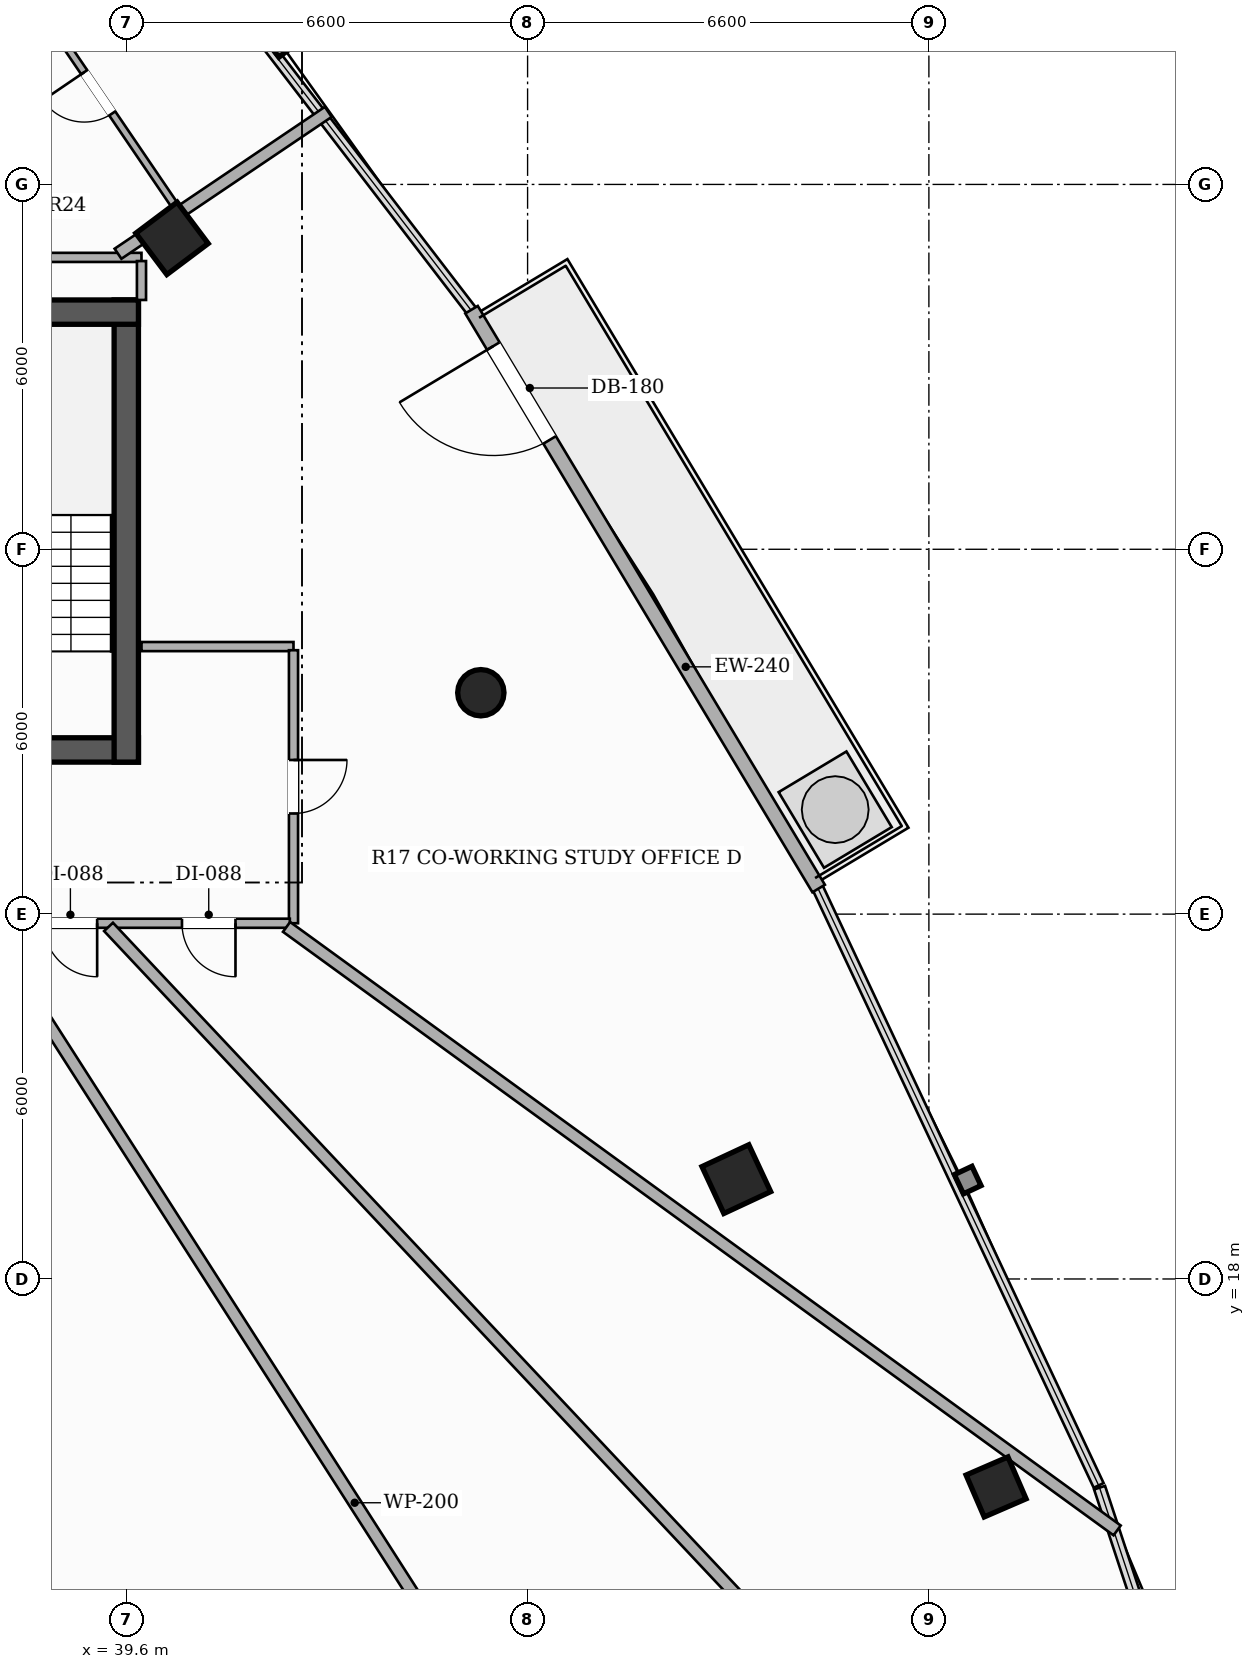
"""IFC4 building model, lengths in metres.
Left out: names, types, materials, properties, quantities, classifications, styles, units other than length and angle.
Written with IfcOpenShell. Run it as: python <this file> out.ifc"""

import sys

from ifc_helpers import new_model, si_unit, direction, frame, frame_2d, origin, origin_2d, place, context, subcontext, project, spatial, rectangle, hollow_rectangle, hollow_circle, extrude, element, fill, save


model = new_model("IFC4")
c1 = context("Model", 3, precision=1e-05, world=origin(), true_north=direction((0.0, 1.0)))
c2 = subcontext(c1, "Body", "Model", "MODEL_VIEW")
j1 = project(units=[si_unit("LENGTHUNIT", "METRE"), si_unit("PLANEANGLEUNIT", "RADIAN")], contexts=[c1])
p1 = place(None, origin())
s1 = spatial("IfcSite", under=j1, at=p1, CompositionType="ELEMENT")
p2 = place(p1, origin())
s2 = spatial("IfcBuilding", under=s1, at=p2, CompositionType="ELEMENT")
p3 = place(p2, frame((0.0, 0.0, 163.85)))
s3 = spatial("IfcBuildingStorey", under=s2, at=p3, CompositionType="ELEMENT", Elevation=163.85)
p4 = place(p3, frame((26.2, 26.7, 0.0), z_axis=(0.0, 0.0, 1.0), x_axis=(1.0, 0.0, 0.0)))
e1 = element("IfcWall", 1, at=p4, inside=s3, PredefinedType="SHEAR", context=c2, shape_type="SweptSolid", body=[
    extrude(rectangle(XDim=13.6, YDim=0.4, at=frame_2d((6.8, 0.0))), origin(), (0.0, 0.0, 1.0), 3.3),
])
p5 = place(p4, frame((4.35, 0.0, 0.0)))
e2 = element("IfcOpeningElement", 2, at=p5, cuts=e1, PredefinedType="OPENING", context=c2, shape_type="SweptSolid", body=[
    extrude(rectangle(XDim=1.05, YDim=2.15, at=frame_2d((0.525, 1.075))), frame((0.0, 0.21, 0.0), z_axis=(0.0, -1.0, 0.0), x_axis=(1.0, 0.0, 0.0)), (0.0, 0.0, 1.0), 0.42),
])
p6 = place(p4, frame((8.3, 0.0, 0.0)))
e3 = element("IfcOpeningElement", 3, at=p6, cuts=e1, PredefinedType="OPENING", context=c2, shape_type="SweptSolid", body=[
    extrude(rectangle(XDim=1.05, YDim=2.15, at=frame_2d((0.525, 1.075))), frame((0.0, 0.21, 0.0), z_axis=(0.0, -1.0, 0.0), x_axis=(1.0, 0.0, 0.0)), (0.0, 0.0, 1.0), 0.42),
])
p7 = place(p3, frame((39.6, 26.5, 0.0), z_axis=(0.0, 0.0, 1.0), x_axis=(0.0, 1.0, 0.0)))
e4 = element("IfcWall", 4, at=p7, inside=s3, PredefinedType="SHEAR", context=c2, shape_type="SweptSolid", body=[
    extrude(rectangle(XDim=7.6, YDim=0.4, at=frame_2d((3.8, 0.0))), origin(), (0.0, 0.0, 1.0), 3.3),
])
p8 = place(p3, frame((36.12, 33.9, 0.0), z_axis=(0.0, 0.0, 1.0), x_axis=(1.0, 0.0, 0.0)))
e5 = element("IfcWall", 5, at=p8, inside=s3, PredefinedType="SHEAR", context=c2, shape_type="SweptSolid", body=[
    extrude(rectangle(XDim=3.68, YDim=0.4, at=frame_2d((1.84, 0.0))), origin(), (0.0, 0.0, 1.0), 3.3),
])
p9 = place(p3, frame((49.633, 19.642, 0.0), z_axis=(0.0, 0.0, 1.0), x_axis=(-0.422618261741, 0.906307787037, 0.0)))
e6 = element("IfcColumn", 6, at=p9, inside=s3, PredefinedType="COLUMN", context=c2, shape_type="SweptSolid", body=[
    extrude(hollow_rectangle(XDim=0.85, YDim=0.85, WallThickness=0.028, at=origin_2d()), origin(), (0.0, 0.0, 1.0), 3.3),
])
p10 = place(p3, frame((45.431, 27.641, 0.0), z_axis=(0.0, 0.0, 1.0), x_axis=(1.0, 0.0, 0.0)))
e7 = element("IfcColumn", 7, at=p10, inside=s3, PredefinedType="COLUMN", context=c2, shape_type="SweptSolid", body=[
    extrude(hollow_circle(Radius=0.381, WallThickness=0.022, at=origin_2d()), origin(), (0.0, 0.0, 1.0), 3.3),
])
p11 = place(p3, frame((40.352, 35.113, 0.0), z_axis=(0.0, 0.0, 1.0), x_axis=(-0.600420225326, 0.799684658487, 0.0)))
e8 = element("IfcColumn", 8, at=p11, inside=s3, PredefinedType="COLUMN", context=c2, shape_type="SweptSolid", body=[
    extrude(hollow_rectangle(XDim=0.85, YDim=0.85, WallThickness=0.028, at=origin_2d()), origin(), (0.0, 0.0, 1.0), 3.3),
])
p12 = place(p3, frame((53.905, 14.58, 0.0), z_axis=(0.0, 0.0, 1.0), x_axis=(-0.397147890635, 0.917754625684, 0.0)))
e9 = element("IfcColumn", 9, at=p12, inside=s3, PredefinedType="COLUMN", context=c2, shape_type="SweptSolid", body=[
    extrude(hollow_rectangle(XDim=0.75, YDim=0.75, WallThickness=0.025, at=origin_2d()), origin(), (0.0, 0.0, 1.0), 3.3),
])
p13 = place(p3, frame((50.987, 24.421, 0.0), z_axis=(0.0, 0.0, 1.0), x_axis=(-0.514334017412, 0.85758994778, 0.0)))
e10 = element("IfcWall", 10, at=p13, inside=s3, PredefinedType="SOLIDWALL", context=c2, shape_type="SweptSolid", body=[
    extrude(rectangle(XDim=11.1, YDim=0.24, at=frame_2d((5.55, 0.0))), origin(), (0.0, 0.0, 1.0), 2.624),
])
p14 = place(p13, frame((8.602, 0.0, 0.0)))
e11 = element("IfcOpeningElement", 11, at=p14, cuts=e10, PredefinedType="OPENING", context=c2, shape_type="SweptSolid", body=[
    extrude(rectangle(XDim=1.8, YDim=2.2, at=frame_2d((0.9, 1.1))), frame((0.0, 0.13, 0.0), z_axis=(0.0, -1.0, 0.0), x_axis=(1.0, 0.0, 0.0)), (0.0, 0.0, 1.0), 0.26),
])
p15 = place(p3, frame((39.85, 28.4, 0.0), z_axis=(0.0, 0.0, 1.0), x_axis=(1.0, 0.0, 0.0)))
e12 = element("IfcWall", 12, at=p15, inside=s3, PredefinedType="PARTITIONING", context=c2, shape_type="SweptSolid", body=[
    extrude(rectangle(XDim=2.5, YDim=0.15, at=frame_2d((1.25, 0.0))), origin(), (0.0, 0.0, 1.0), 2.721),
])
p16 = place(p3, frame((42.35, 28.34, 0.0), z_axis=(0.0, 0.0, 1.0), x_axis=(0.0, -1.0, 0.0)))
e13 = element("IfcWall", 13, at=p16, inside=s3, PredefinedType="PARTITIONING", context=c2, shape_type="SweptSolid", body=[
    extrude(rectangle(XDim=4.49, YDim=0.15, at=frame_2d((2.245, 0.0))), origin(), (0.0, 0.0, 1.0), 2.721),
])
p17 = place(p16, frame((1.805, 0.0, 0.0)))
e14 = element("IfcOpeningElement", 14, at=p17, cuts=e13, PredefinedType="OPENING", context=c2, shape_type="SweptSolid", body=[
    extrude(rectangle(XDim=0.88, YDim=2.1, at=frame_2d((0.44, 1.05))), frame((0.0, 0.085, 0.0), z_axis=(0.0, -1.0, 0.0), x_axis=(1.0, 0.0, 0.0)), (0.0, 0.0, 1.0), 0.17),
])
p18 = place(p3, frame((42.29, 23.85, 0.0), z_axis=(0.0, 0.0, 1.0), x_axis=(-1.0, 0.0, 0.0)))
e15 = element("IfcWall", 15, at=p18, inside=s3, PredefinedType="PARTITIONING", context=c2, shape_type="SweptSolid", body=[
    extrude(rectangle(XDim=8.202, YDim=0.15, at=frame_2d((4.101, 0.0))), origin(), (0.0, 0.0, 1.0), 2.492),
])
p19 = place(p18, frame((5.987, 0.0, 0.0)))
e16 = element("IfcOpeningElement", 16, at=p19, cuts=e15, PredefinedType="OPENING", context=c2, shape_type="SweptSolid", body=[
    extrude(rectangle(XDim=0.92, YDim=2.15, at=frame_2d((0.46, 1.075))), frame((0.0, 0.085, 0.0), z_axis=(0.0, -1.0, 0.0), x_axis=(1.0, 0.0, 0.0)), (0.0, 0.0, 1.0), 0.17),
])
p20 = place(p18, frame((0.894, 0.0, 0.0)))
e17 = element("IfcOpeningElement", 17, at=p20, cuts=e15, PredefinedType="OPENING", context=c2, shape_type="SweptSolid", body=[
    extrude(rectangle(XDim=0.88, YDim=2.1, at=frame_2d((0.44, 1.05))), frame((0.0, 0.085, 0.0), z_axis=(0.0, -1.0, 0.0), x_axis=(1.0, 0.0, 0.0)), (0.0, 0.0, 1.0), 0.17),
])
p21 = place(p18, frame((3.169, 0.0, 0.0)))
e18 = element("IfcOpeningElement", 18, at=p21, cuts=e15, PredefinedType="OPENING", context=c2, shape_type="SweptSolid", body=[
    extrude(rectangle(XDim=0.88, YDim=2.1, at=frame_2d((0.44, 1.05))), frame((0.0, 0.085, 0.0), z_axis=(0.0, -1.0, 0.0), x_axis=(1.0, 0.0, 0.0)), (0.0, 0.0, 1.0), 0.17),
])
p22 = place(p3, frame((37.91, 34.8, 0.0), z_axis=(0.0, 0.0, 1.0), x_axis=(1.0, 0.0, 0.0)))
e19 = element("IfcWall", 19, at=p22, inside=s3, PredefinedType="PARTITIONING", context=c2, shape_type="SweptSolid", body=[
    extrude(rectangle(XDim=1.94, YDim=0.15, at=frame_2d((0.97, 0.0))), origin(), (0.0, 0.0, 1.0), 2.721),
])
p23 = place(p3, frame((39.85, 34.74, 0.0), z_axis=(0.0, 0.0, 1.0), x_axis=(0.0, -1.0, 0.0)))
e20 = element("IfcWall", 20, at=p23, inside=s3, PredefinedType="PARTITIONING", context=c2, shape_type="SweptSolid", body=[
    extrude(rectangle(XDim=0.64, YDim=0.15, at=frame_2d((0.32, 0.0))), origin(), (0.0, 0.0, 1.0), 2.721),
])
p24 = place(p3, frame((37.295, 23.79, 0.0), z_axis=(0.0, 0.0, 1.0), x_axis=(0.539100523601, -0.842241429433, 0.0)))
e21 = element("IfcWall", 21, at=p24, inside=s3, PredefinedType="PARTITIONING", context=c2, shape_type="SweptSolid", body=[
    extrude(rectangle(XDim=22.488, YDim=0.2, at=frame_2d((11.244, 0.0))), origin(), (0.0, 0.0, 1.0), 2.413),
])
p25 = place(p3, frame((39.464, 34.86, 0.0), z_axis=(0.0, 0.0, 1.0), x_axis=(0.828976210701, 0.559283865395, 0.0)))
e22 = element("IfcWall", 22, at=p25, inside=s3, PredefinedType="PARTITIONING", context=c2, shape_type="SweptSolid", body=[
    extrude(rectangle(XDim=4.171, YDim=0.2, at=frame_2d((2.086, 0.0))), origin(), (0.0, 0.0, 1.0), 2.413),
])
p26 = place(p3, frame((55.896, 13.865, 0.0), z_axis=(0.0, 0.0, 1.0), x_axis=(-0.809001736781, 0.587806251995, 0.0)))
e23 = element("IfcWall", 23, at=p26, inside=s3, PredefinedType="PARTITIONING", context=c2, shape_type="SweptSolid", body=[
    extrude(rectangle(XDim=16.885, YDim=0.2, at=frame_2d((8.442, 0.0))), origin(), (0.0, 0.0, 1.0), 2.413),
])
p27 = place(p3, frame((56.122, 5.904, 0.0), z_axis=(0.0, 0.0, 1.0), x_axis=(-0.684934612975, 0.728604540165, 0.0)))
e24 = element("IfcWall", 24, at=p27, inside=s3, PredefinedType="PARTITIONING", context=c2, shape_type="SweptSolid", body=[
    extrude(rectangle(XDim=24.548, YDim=0.2, at=frame_2d((12.274, 0.0))), origin(), (0.0, 0.0, 1.0), 2.413),
])
p28 = place(p3, frame((40.427, 35.612, 0.0), z_axis=(0.0, 0.0, 1.0), x_axis=(-0.562385802303, 0.826874965982, 0.0)))
e25 = element("IfcWall", 25, at=p28, inside=s3, PredefinedType="PARTITIONING", context=c2, shape_type="SweptSolid", body=[
    extrude(rectangle(XDim=4.582, YDim=0.12, at=frame_2d((2.291, 0.0))), origin(), (0.0, 0.0, 1.0), 2.413),
])
p29 = place(p28, frame((1.881, 0.0, 0.0)))
e26 = element("IfcOpeningElement", 26, at=p29, cuts=e25, PredefinedType="OPENING", context=c2, shape_type="SweptSolid", body=[
    extrude(rectangle(XDim=0.82, YDim=2.1, at=frame_2d((0.41, 1.05))), frame((0.0, 0.07, 0.0), z_axis=(0.0, -1.0, 0.0), x_axis=(1.0, 0.0, 0.0)), (0.0, 0.0, 1.0), 0.14),
])
p30 = place(p14, origin())
e27 = element("IfcDoor", 27, at=p30, inside=s3, OperationType="SINGLE_SWING_RIGHT", PredefinedType="DOOR", context=c2, shape_type="SweptSolid", body=[
    extrude(rectangle(XDim=1.8, YDim=2.2, at=frame_2d((0.9, 1.1))), frame((0.0, 0.025, 0.0), z_axis=(0.0, -1.0, 0.0), x_axis=(1.0, 0.0, 0.0)), (0.0, 0.0, 1.0), 0.05),
])
fill(e11, e27)
p31 = place(p17, origin())
e28 = element("IfcDoor", 28, at=p31, inside=s3, OperationType="SINGLE_SWING_LEFT", PredefinedType="DOOR", context=c2, shape_type="SweptSolid", body=[
    extrude(rectangle(XDim=0.88, YDim=2.1, at=frame_2d((0.44, 1.05))), frame((0.0, 0.025, 0.0), z_axis=(0.0, -1.0, 0.0), x_axis=(1.0, 0.0, 0.0)), (0.0, 0.0, 1.0), 0.05),
])
fill(e14, e28)
p32 = place(p29, origin())
e29 = element("IfcDoor", 29, at=p32, inside=s3, OperationType="SINGLE_SWING_RIGHT", PredefinedType="DOOR", context=c2, shape_type="SweptSolid", body=[
    extrude(rectangle(XDim=0.82, YDim=2.1, at=frame_2d((0.41, 1.05))), frame((0.0, 0.025, 0.0), z_axis=(0.0, -1.0, 0.0), x_axis=(1.0, 0.0, 0.0)), (0.0, 0.0, 1.0), 0.05),
])
fill(e26, e29)
p33 = place(p20, origin())
e30 = element("IfcDoor", 30, at=p33, inside=s3, OperationType="SINGLE_SWING_LEFT", PredefinedType="DOOR", context=c2, shape_type="SweptSolid", body=[
    extrude(rectangle(XDim=0.88, YDim=2.1, at=frame_2d((0.44, 1.05))), frame((0.0, 0.025, 0.0), z_axis=(0.0, -1.0, 0.0), x_axis=(1.0, 0.0, 0.0)), (0.0, 0.0, 1.0), 0.05),
])
fill(e17, e30)
p34 = place(p21, origin())
e31 = element("IfcDoor", 31, at=p34, inside=s3, OperationType="SINGLE_SWING_LEFT", PredefinedType="DOOR", context=c2, shape_type="SweptSolid", body=[
    extrude(rectangle(XDim=0.88, YDim=2.1, at=frame_2d((0.44, 1.05))), frame((0.0, 0.025, 0.0), z_axis=(0.0, -1.0, 0.0), x_axis=(1.0, 0.0, 0.0)), (0.0, 0.0, 1.0), 0.05),
])
fill(e18, e31)
save(model, sys.argv[1])
